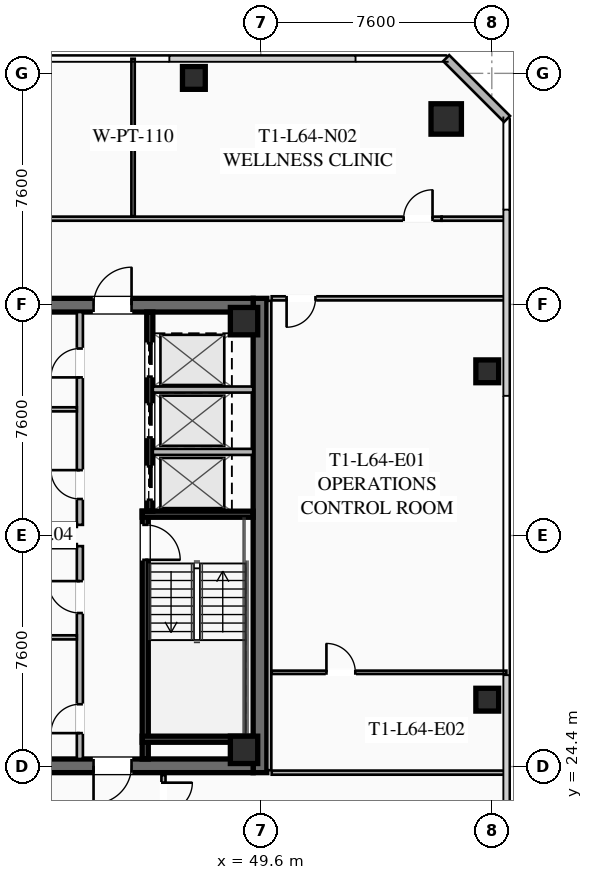
"""IFC4 building model, lengths in metres.
Left out: names, types, materials, properties, quantities, classifications, styles, units other than length and angle.
Written with IfcOpenShell. Run it as: python <this file> out.ifc"""

import sys

from ifc_helpers import new_model, si_unit, direction, frame, frame_2d, origin, origin_2d, place, context, subcontext, project, spatial, rectangle, hollow_rectangle, extrude, element, fill, save


model = new_model("IFC4")
c1 = context("Model", 3, precision=1e-05, world=origin(), true_north=direction((0.0, 1.0)))
c2 = subcontext(c1, "Body", "Model", "MODEL_VIEW")
j1 = project(units=[si_unit("LENGTHUNIT", "METRE"), si_unit("PLANEANGLEUNIT", "RADIAN")], contexts=[c1])
p1 = place(None, origin())
s1 = spatial("IfcSite", under=j1, at=p1, CompositionType="ELEMENT")
p2 = place(p1, origin())
s2 = spatial("IfcBuilding", under=s1, at=p2, CompositionType="ELEMENT")
p3 = place(p2, frame((0.0, 0.0, 236.15)))
s3 = spatial("IfcBuildingStorey", under=s2, at=p3, CompositionType="ELEMENT", Elevation=236.15)
p4 = place(p3, frame((49.575, 39.8, 0.0), z_axis=(0.0, 0.0, 1.0), x_axis=(0.0, -1.0, 0.0)))
e1 = element("IfcWall", 1, at=p4, inside=s3, PredefinedType="SHEAR", context=c2, shape_type="SweptSolid", body=[
    extrude(rectangle(XDim=15.6, YDim=0.45, at=frame_2d((7.8, 0.0))), origin(), (0.0, 0.0, 1.0), 3.55),
])
p5 = place(p3, frame((49.35, 24.425, 0.0), z_axis=(0.0, 0.0, 1.0), x_axis=(-1.0, 0.0, 0.0)))
e2 = element("IfcWall", 2, at=p5, inside=s3, PredefinedType="SHEAR", context=c2, shape_type="SweptSolid", body=[
    extrude(rectangle(XDim=14.7, YDim=0.45, at=frame_2d((7.35, 0.0))), origin(), (0.0, 0.0, 1.0), 3.55),
])
p6 = place(p5, frame((9.05, 0.0, 0.0)))
e3 = element("IfcOpeningElement", 3, at=p6, cuts=e2, PredefinedType="OPENING", context=c2, shape_type="SweptSolid", body=[
    extrude(rectangle(XDim=1.25, YDim=2.25, at=frame_2d((0.625, 1.125))), frame((0.0, 0.235, 0.0), z_axis=(0.0, -1.0, 0.0), x_axis=(1.0, 0.0, 0.0)), (0.0, 0.0, 1.0), 0.47),
])
p7 = place(p5, frame((4.0, 0.0, 0.0)))
e4 = element("IfcOpeningElement", 4, at=p7, cuts=e2, PredefinedType="OPENING", context=c2, shape_type="SweptSolid", body=[
    extrude(rectangle(XDim=1.25, YDim=2.25, at=frame_2d((0.625, 1.125))), frame((0.0, 0.235, 0.0), z_axis=(0.0, -1.0, 0.0), x_axis=(1.0, 0.0, 0.0)), (0.0, 0.0, 1.0), 0.47),
])
p8 = place(p3, frame((34.65, 39.575, 0.0), z_axis=(0.0, 0.0, 1.0), x_axis=(1.0, 0.0, 0.0)))
e5 = element("IfcWall", 5, at=p8, inside=s3, PredefinedType="SHEAR", context=c2, shape_type="SweptSolid", body=[
    extrude(rectangle(XDim=14.7, YDim=0.45, at=frame_2d((7.35, 0.0))), origin(), (0.0, 0.0, 1.0), 3.55),
])
p9 = place(p8, frame((4.4, 0.0, 0.0)))
e6 = element("IfcOpeningElement", 6, at=p9, cuts=e5, PredefinedType="OPENING", context=c2, shape_type="SweptSolid", body=[
    extrude(rectangle(XDim=1.25, YDim=2.25, at=frame_2d((0.625, 1.125))), frame((0.0, 0.235, 0.0), z_axis=(0.0, -1.0, 0.0), x_axis=(1.0, 0.0, 0.0)), (0.0, 0.0, 1.0), 0.47),
])
p10 = place(p8, frame((9.45, 0.0, 0.0)))
e7 = element("IfcOpeningElement", 7, at=p10, cuts=e5, PredefinedType="OPENING", context=c2, shape_type="SweptSolid", body=[
    extrude(rectangle(XDim=1.25, YDim=2.25, at=frame_2d((0.625, 1.125))), frame((0.0, 0.235, 0.0), z_axis=(0.0, -1.0, 0.0), x_axis=(1.0, 0.0, 0.0)), (0.0, 0.0, 1.0), 0.47),
])
for number, where, z_axis, x_axis in (
    (8, (49.05, 24.95, 0.0), (0.0, 0.0, 1.0), (1.0, 0.0, 0.0)),
    (9, (49.05, 39.05, 0.0), (0.0, 0.0, 1.0), (1.0, 0.0, 0.0)),
):
    element("IfcColumn", number, at=place(p3, frame(where, z_axis=z_axis, x_axis=x_axis)), inside=s3, PredefinedType="COLUMN", context=c2, shape_type="SweptSolid", body=[
        extrude(hollow_rectangle(XDim=0.9, YDim=0.9, WallThickness=0.04, at=origin_2d()), origin(), (0.0, 0.0, 1.0), 3.37),
    ])
p11 = place(p3, frame((55.7, 45.7, 0.0), z_axis=(0.0, 0.0, 1.0), x_axis=(1.0, 0.0, 0.0)))
e10 = element("IfcColumn", 10, at=p11, inside=s3, PredefinedType="COLUMN", context=c2, shape_type="SweptSolid", body=[
    extrude(hollow_rectangle(XDim=1.0, YDim=1.0, WallThickness=0.04, at=origin_2d()), origin(), (0.0, 0.0, 1.0), 3.37),
])
for number, where, z_axis, x_axis in (
    (11, (57.05, 26.6, 0.0), (0.0, 0.0, 1.0), (1.0, 0.0, 0.0)),
    (12, (57.05, 37.4, 0.0), (0.0, 0.0, 1.0), (1.0, 0.0, 0.0)),
    (13, (47.4, 47.05, 0.0), (0.0, 0.0, 1.0), (1.0, 0.0, 0.0)),
):
    element("IfcColumn", number, at=place(p3, frame(where, z_axis=z_axis, x_axis=x_axis)), inside=s3, PredefinedType="COLUMN", context=c2, shape_type="SweptSolid", body=[
        extrude(hollow_rectangle(XDim=0.75, YDim=0.75, WallThickness=0.032, at=origin_2d()), origin(), (0.0, 0.0, 1.0), 3.37),
    ])
p12 = place(p3, frame((55.7, 47.7, 0.0), z_axis=(0.0, 0.0, 1.0), x_axis=(0.707106781187, -0.707106781187, 0.0)))
e14 = element("IfcWall", 14, at=p12, inside=s3, PredefinedType="SOLIDWALL", context=c2, shape_type="SweptSolid", body=[
    extrude(rectangle(XDim=2.828, YDim=0.28, at=frame_2d((1.414, 0.0))), origin(), (0.0, 0.0, 1.0), 3.37),
])
p13 = place(p3, frame((45.8, 32.8, 0.0), z_axis=(0.0, 0.0, 1.0), x_axis=(0.0, -1.0, 0.0)))
e15 = element("IfcWall", 15, at=p13, inside=s3, PredefinedType="SHEAR", context=c2, shape_type="SweptSolid", body=[
    extrude(rectangle(XDim=8.15, YDim=0.2, at=frame_2d((4.075, 0.0))), origin(), (0.0, 0.0, 1.0), 3.37),
])
p14 = place(p13, frame((0.45, 0.0, 0.0)))
e16 = element("IfcOpeningElement", 16, at=p14, cuts=e15, PredefinedType="OPENING", context=c2, shape_type="SweptSolid", body=[
    extrude(rectangle(XDim=1.15, YDim=2.2, at=frame_2d((0.575, 1.1))), frame((0.0, 0.11, 0.0), z_axis=(0.0, -1.0, 0.0), x_axis=(1.0, 0.0, 0.0)), (0.0, 0.0, 1.0), 0.22),
])
for number, where, z_axis, x_axis in (
    (17, (45.7, 32.7, 0.0), (0.0, 0.0, 1.0), (1.0, 0.0, 0.0)),
    (18, (45.7, 25.3, 0.0), (0.0, 0.0, 1.0), (1.0, 0.0, 0.0)),
):
    element("IfcWall", number, at=place(p3, frame(where, z_axis=z_axis, x_axis=x_axis)), inside=s3, PredefinedType="SHEAR", context=c2, shape_type="SweptSolid", body=[
        extrude(rectangle(XDim=3.65, YDim=0.2, at=frame_2d((1.825, 0.0))), origin(), (0.0, 0.0, 1.0), 3.37),
    ])
p15 = place(p3, frame((45.95, 39.35, 0.0), z_axis=(0.0, 0.0, 1.0), x_axis=(0.0, -1.0, 0.0)))
e19 = element("IfcWall", 19, at=p15, inside=s3, PredefinedType="SHEAR", context=c2, shape_type="SweptSolid", body=[
    extrude(rectangle(XDim=6.55, YDim=0.2, at=frame_2d((3.275, 0.0))), origin(), (0.0, 0.0, 1.0), 3.37),
])
p16 = place(p15, frame((5.075, 0.0, 0.0)))
e20 = element("IfcOpeningElement", 20, at=p16, cuts=e19, PredefinedType="OPENING", context=c2, shape_type="SweptSolid", body=[
    extrude(rectangle(XDim=1.1, YDim=2.2, at=frame_2d((0.55, 1.1))), frame((0.0, 0.11, 0.0), z_axis=(0.0, -1.0, 0.0), x_axis=(1.0, 0.0, 0.0)), (0.0, 0.0, 1.0), 0.22),
])
p17 = place(p15, frame((3.025, 0.0, 0.0)))
e21 = element("IfcOpeningElement", 21, at=p17, cuts=e19, PredefinedType="OPENING", context=c2, shape_type="SweptSolid", body=[
    extrude(rectangle(XDim=1.1, YDim=2.2, at=frame_2d((0.55, 1.1))), frame((0.0, 0.11, 0.0), z_axis=(0.0, -1.0, 0.0), x_axis=(1.0, 0.0, 0.0)), (0.0, 0.0, 1.0), 0.22),
])
p18 = place(p15, frame((1.025, 0.0, 0.0)))
e22 = element("IfcOpeningElement", 22, at=p18, cuts=e19, PredefinedType="OPENING", context=c2, shape_type="SweptSolid", body=[
    extrude(rectangle(XDim=1.1, YDim=2.2, at=frame_2d((0.55, 1.1))), frame((0.0, 0.11, 0.0), z_axis=(0.0, -1.0, 0.0), x_axis=(1.0, 0.0, 0.0)), (0.0, 0.0, 1.0), 0.22),
])
for number, where, z_axis, x_axis in (
    (23, (46.05, 34.75, 0.0), (0.0, 0.0, 1.0), (1.0, 0.0, 0.0)),
    (24, (46.05, 36.8, 0.0), (0.0, 0.0, 1.0), (1.0, 0.0, 0.0)),
):
    element("IfcWall", number, at=place(p3, frame(where, z_axis=z_axis, x_axis=x_axis)), inside=s3, PredefinedType="SOLIDWALL", context=c2, shape_type="SweptSolid", body=[
        extrude(rectangle(XDim=3.3, YDim=0.2, at=frame_2d((1.65, 0.0))), origin(), (0.0, 0.0, 1.0), 3.37),
    ])
p19 = place(p3, frame((43.65, 24.65, 0.0), z_axis=(0.0, 0.0, 1.0), x_axis=(0.0, 1.0, 0.0)))
e25 = element("IfcWall", 25, at=p19, inside=s3, PredefinedType="SOLIDWALL", context=c2, shape_type="SweptSolid", body=[
    extrude(rectangle(XDim=7.0, YDim=0.2, at=frame_2d((3.5, 0.0))), origin(), (0.0, 0.0, 1.0), 2.723),
])
p20 = place(p19, frame((0.85, 0.0, 0.0)))
e26 = element("IfcOpeningElement", 26, at=p20, cuts=e25, PredefinedType="OPENING", context=c2, shape_type="SweptSolid", body=[
    extrude(rectangle(XDim=0.95, YDim=2.05, at=frame_2d((0.475, 1.025))), frame((0.0, 0.11, 0.0), z_axis=(0.0, -1.0, 0.0), x_axis=(1.0, 0.0, 0.0)), (0.0, 0.0, 1.0), 0.22),
])
p21 = place(p19, frame((4.8, 0.0, 0.0)))
e27 = element("IfcOpeningElement", 27, at=p21, cuts=e25, PredefinedType="OPENING", context=c2, shape_type="SweptSolid", body=[
    extrude(rectangle(XDim=1.05, YDim=2.2, at=frame_2d((0.525, 1.1))), frame((0.0, 0.11, 0.0), z_axis=(0.0, -1.0, 0.0), x_axis=(1.0, 0.0, 0.0)), (0.0, 0.0, 1.0), 0.22),
])
for number, where, z_axis, x_axis in (
    (28, (41.67, 31.65, 0.0), (0.0, 0.0, 1.0), (1.0, 0.0, 0.0)),
    (29, (41.67, 28.65, 0.0), (0.0, 0.0, 1.0), (1.0, 0.0, 0.0)),
):
    element("IfcWall", number, at=place(p3, frame(where, z_axis=z_axis, x_axis=x_axis)), inside=s3, PredefinedType="PARTITIONING", context=c2, shape_type="SweptSolid", body=[
        extrude(rectangle(XDim=1.88, YDim=0.135, at=frame_2d((0.94, 0.0))), origin(), (0.0, 0.0, 1.0), 2.723),
    ])
p22 = place(p3, frame((43.65, 32.35, 0.0), z_axis=(0.0, 0.0, 1.0), x_axis=(0.0, 1.0, 0.0)))
e30 = element("IfcWall", 30, at=p22, inside=s3, PredefinedType="SOLIDWALL", context=c2, shape_type="SweptSolid", body=[
    extrude(rectangle(XDim=7.0, YDim=0.2, at=frame_2d((3.5, 0.0))), origin(), (0.0, 0.0, 1.0), 2.723),
])
p23 = place(p22, frame((0.85, 0.0, 0.0)))
e31 = element("IfcOpeningElement", 31, at=p23, cuts=e30, PredefinedType="OPENING", context=c2, shape_type="SweptSolid", body=[
    extrude(rectangle(XDim=0.95, YDim=2.05, at=frame_2d((0.475, 1.025))), frame((0.0, 0.11, 0.0), z_axis=(0.0, -1.0, 0.0), x_axis=(1.0, 0.0, 0.0)), (0.0, 0.0, 1.0), 0.22),
])
p24 = place(p22, frame((4.85, 0.0, 0.0)))
e32 = element("IfcOpeningElement", 32, at=p24, cuts=e30, PredefinedType="OPENING", context=c2, shape_type="SweptSolid", body=[
    extrude(rectangle(XDim=0.95, YDim=2.05, at=frame_2d((0.475, 1.025))), frame((0.0, 0.11, 0.0), z_axis=(0.0, -1.0, 0.0), x_axis=(1.0, 0.0, 0.0)), (0.0, 0.0, 1.0), 0.22),
])
for number, where, z_axis, x_axis in (
    (33, (41.67, 32.35, 0.0), (0.0, 0.0, 1.0), (1.0, 0.0, 0.0)),
    (34, (41.67, 36.15, 0.0), (0.0, 0.0, 1.0), (1.0, 0.0, 0.0)),
):
    element("IfcWall", number, at=place(p3, frame(where, z_axis=z_axis, x_axis=x_axis)), inside=s3, PredefinedType="PARTITIONING", context=c2, shape_type="SweptSolid", body=[
        extrude(rectangle(XDim=1.88, YDim=0.135, at=frame_2d((0.94, 0.0))), origin(), (0.0, 0.0, 1.0), 2.723),
    ])
p25 = place(p3, frame((28.45, 42.42, 0.0), z_axis=(0.0, 0.0, 1.0), x_axis=(1.0, 0.0, 0.0)))
e35 = element("IfcWall", 35, at=p25, inside=s3, PredefinedType="PARTITIONING", context=c2, shape_type="SweptSolid", body=[
    extrude(rectangle(XDim=27.1, YDim=0.135, at=frame_2d((13.55, 0.0))), origin(), (0.0, 0.0, 1.0), 2.723),
])
p26 = place(p25, frame((0.3, 0.0, 0.0)))
e36 = element("IfcOpeningElement", 36, at=p26, cuts=e35, PredefinedType="OPENING", context=c2, shape_type="SweptSolid", body=[
    extrude(rectangle(XDim=0.95, YDim=2.05, at=frame_2d((0.475, 1.025))), frame((0.0, 0.077, 0.0), z_axis=(0.0, -1.0, 0.0), x_axis=(1.0, 0.0, 0.0)), (0.0, 0.0, 1.0), 0.155),
])
p27 = place(p25, frame((25.85, 0.0, 0.0)))
e37 = element("IfcOpeningElement", 37, at=p27, cuts=e35, PredefinedType="OPENING", context=c2, shape_type="SweptSolid", body=[
    extrude(rectangle(XDim=0.95, YDim=2.05, at=frame_2d((0.475, 1.025))), frame((0.0, 0.077, 0.0), z_axis=(0.0, -1.0, 0.0), x_axis=(1.0, 0.0, 0.0)), (0.0, 0.0, 1.0), 0.155),
])
p28 = place(p3, frame((55.55, 42.42, 0.0), z_axis=(0.0, 0.0, 1.0), x_axis=(1.0, 0.0, 0.0)))
e38 = element("IfcWall", 38, at=p28, inside=s3, PredefinedType="PARTITIONING", context=c2, shape_type="SweptSolid", body=[
    extrude(rectangle(XDim=2.13, YDim=0.135, at=frame_2d((1.065, 0.0))), origin(), (0.0, 0.0, 1.0), 2.723),
])
p29 = place(p3, frame((45.4, 42.5, 0.0), z_axis=(0.0, 0.0, 1.0), x_axis=(0.0, 1.0, 0.0)))
e39 = element("IfcWall", 39, at=p29, inside=s3, PredefinedType="PARTITIONING", context=c2, shape_type="SweptSolid", body=[
    extrude(rectangle(XDim=5.18, YDim=0.11, at=frame_2d((2.59, 0.0))), origin(), (0.0, 0.0, 1.0), 2.723),
])
p30 = place(p3, frame((46.4, 24.12, 0.0), z_axis=(0.0, 0.0, 1.0), x_axis=(0.0, -1.0, 0.0)))
e40 = element("IfcWall", 40, at=p30, inside=s3, PredefinedType="PARTITIONING", context=c2, shape_type="SweptSolid", body=[
    extrude(rectangle(XDim=1.29, YDim=0.135, at=frame_2d((0.645, 0.0))), origin(), (0.0, 0.0, 1.0), 2.723),
])
p31 = place(p30, frame((0.25, 0.0, 0.0)))
e41 = element("IfcOpeningElement", 41, at=p31, cuts=e40, PredefinedType="OPENING", context=c2, shape_type="SweptSolid", body=[
    extrude(rectangle(XDim=0.95, YDim=2.05, at=frame_2d((0.475, 1.025))), frame((0.0, 0.077, 0.0), z_axis=(0.0, -1.0, 0.0), x_axis=(1.0, 0.0, 0.0)), (0.0, 0.0, 1.0), 0.155),
])
p32 = place(p3, frame((49.88, 39.72, 0.0), z_axis=(0.0, 0.0, 1.0), x_axis=(0.0, -1.0, 0.0)))
e42 = element("IfcWall", 42, at=p32, inside=s3, PredefinedType="PARTITIONING", context=c2, shape_type="SweptSolid", body=[
    extrude(rectangle(XDim=15.44, YDim=0.135, at=frame_2d((7.72, 0.0))), origin(), (0.0, 0.0, 1.0), 2.723),
])
p33 = place(p3, frame((57.68, 39.8, 0.0), z_axis=(0.0, 0.0, 1.0), x_axis=(-1.0, 0.0, 0.0)))
e43 = element("IfcWall", 43, at=p33, inside=s3, PredefinedType="PARTITIONING", context=c2, shape_type="SweptSolid", body=[
    extrude(rectangle(XDim=7.72, YDim=0.135, at=frame_2d((3.86, 0.0))), origin(), (0.0, 0.0, 1.0), 2.723),
])
p34 = place(p33, frame((6.28, 0.0, 0.0)))
e44 = element("IfcOpeningElement", 44, at=p34, cuts=e43, PredefinedType="OPENING", context=c2, shape_type="SweptSolid", body=[
    extrude(rectangle(XDim=0.95, YDim=2.05, at=frame_2d((0.475, 1.025))), frame((0.0, 0.077, 0.0), z_axis=(0.0, -1.0, 0.0), x_axis=(1.0, 0.0, 0.0)), (0.0, 0.0, 1.0), 0.155),
])
p35 = place(p3, frame((49.96, 24.2, 0.0), z_axis=(0.0, 0.0, 1.0), x_axis=(1.0, 0.0, 0.0)))
e45 = element("IfcWall", 45, at=p35, inside=s3, PredefinedType="PARTITIONING", context=c2, shape_type="SweptSolid", body=[
    extrude(rectangle(XDim=7.72, YDim=0.135, at=frame_2d((3.86, 0.0))), origin(), (0.0, 0.0, 1.0), 2.723),
])
p36 = place(p3, frame((49.96, 27.5, 0.0), z_axis=(0.0, 0.0, 1.0), x_axis=(1.0, 0.0, 0.0)))
e46 = element("IfcWall", 46, at=p36, inside=s3, PredefinedType="PARTITIONING", context=c2, shape_type="SweptSolid", body=[
    extrude(rectangle(XDim=7.72, YDim=0.11, at=frame_2d((3.86, 0.0))), origin(), (0.0, 0.0, 1.0), 2.723),
])
p37 = place(p36, frame((1.8, 0.0, 0.0)))
e47 = element("IfcOpeningElement", 47, at=p37, cuts=e46, PredefinedType="OPENING", context=c2, shape_type="SweptSolid", body=[
    extrude(rectangle(XDim=0.95, YDim=2.05, at=frame_2d((0.475, 1.025))), frame((0.0, 0.065, 0.0), z_axis=(0.0, -1.0, 0.0), x_axis=(1.0, 0.0, 0.0)), (0.0, 0.0, 1.0), 0.13),
])
p38 = place(p10, origin())
e48 = element("IfcDoor", 48, at=p38, inside=s3, OperationType="SINGLE_SWING_RIGHT", PredefinedType="DOOR", context=c2, shape_type="SweptSolid", body=[
    extrude(rectangle(XDim=1.25, YDim=2.25, at=frame_2d((0.625, 1.125))), frame((0.0, 0.025, 0.0), z_axis=(0.0, -1.0, 0.0), x_axis=(1.0, 0.0, 0.0)), (0.0, 0.0, 1.0), 0.05),
])
fill(e7, e48)
p39 = place(p7, origin())
e49 = element("IfcDoor", 49, at=p39, inside=s3, OperationType="SINGLE_SWING_RIGHT", PredefinedType="DOOR", context=c2, shape_type="SweptSolid", body=[
    extrude(rectangle(XDim=1.25, YDim=2.25, at=frame_2d((0.625, 1.125))), frame((0.0, 0.025, 0.0), z_axis=(0.0, -1.0, 0.0), x_axis=(1.0, 0.0, 0.0)), (0.0, 0.0, 1.0), 0.05),
])
fill(e4, e49)
p40 = place(p14, origin())
e50 = element("IfcDoor", 50, at=p40, inside=s3, OperationType="SINGLE_SWING_RIGHT", PredefinedType="DOOR", context=c2, shape_type="SweptSolid", body=[
    extrude(rectangle(XDim=1.15, YDim=2.2, at=frame_2d((0.575, 1.1))), frame((0.0, 0.025, 0.0), z_axis=(0.0, -1.0, 0.0), x_axis=(1.0, 0.0, 0.0)), (0.0, 0.0, 1.0), 0.05),
])
fill(e16, e50)
p41 = place(p20, origin())
e51 = element("IfcDoor", 51, at=p41, inside=s3, OperationType="SINGLE_SWING_LEFT", PredefinedType="DOOR", context=c2, shape_type="SweptSolid", body=[
    extrude(rectangle(XDim=0.95, YDim=2.05, at=frame_2d((0.475, 1.025))), frame((0.0, 0.025, 0.0), z_axis=(0.0, -1.0, 0.0), x_axis=(1.0, 0.0, 0.0)), (0.0, 0.0, 1.0), 0.05),
])
fill(e26, e51)
p42 = place(p21, origin())
e52 = element("IfcDoor", 52, at=p42, inside=s3, OperationType="SINGLE_SWING_RIGHT", PredefinedType="DOOR", context=c2, shape_type="SweptSolid", body=[
    extrude(rectangle(XDim=1.05, YDim=2.2, at=frame_2d((0.525, 1.1))), frame((0.0, 0.025, 0.0), z_axis=(0.0, -1.0, 0.0), x_axis=(1.0, 0.0, 0.0)), (0.0, 0.0, 1.0), 0.05),
])
fill(e27, e52)
p43 = place(p23, origin())
e53 = element("IfcDoor", 53, at=p43, inside=s3, OperationType="SINGLE_SWING_RIGHT", PredefinedType="DOOR", context=c2, shape_type="SweptSolid", body=[
    extrude(rectangle(XDim=0.95, YDim=2.05, at=frame_2d((0.475, 1.025))), frame((0.0, 0.025, 0.0), z_axis=(0.0, -1.0, 0.0), x_axis=(1.0, 0.0, 0.0)), (0.0, 0.0, 1.0), 0.05),
])
fill(e31, e53)
p44 = place(p24, origin())
e54 = element("IfcDoor", 54, at=p44, inside=s3, OperationType="SINGLE_SWING_LEFT", PredefinedType="DOOR", context=c2, shape_type="SweptSolid", body=[
    extrude(rectangle(XDim=0.95, YDim=2.05, at=frame_2d((0.475, 1.025))), frame((0.0, 0.025, 0.0), z_axis=(0.0, -1.0, 0.0), x_axis=(1.0, 0.0, 0.0)), (0.0, 0.0, 1.0), 0.05),
])
fill(e32, e54)
p45 = place(p27, origin())
e55 = element("IfcDoor", 55, at=p45, inside=s3, OperationType="SINGLE_SWING_RIGHT", PredefinedType="DOOR", context=c2, shape_type="SweptSolid", body=[
    extrude(rectangle(XDim=0.95, YDim=2.05, at=frame_2d((0.475, 1.025))), frame((0.0, 0.025, 0.0), z_axis=(0.0, -1.0, 0.0), x_axis=(1.0, 0.0, 0.0)), (0.0, 0.0, 1.0), 0.05),
])
fill(e37, e55)
p46 = place(p31, origin())
e56 = element("IfcDoor", 56, at=p46, inside=s3, OperationType="SINGLE_SWING_LEFT", PredefinedType="DOOR", context=c2, shape_type="SweptSolid", body=[
    extrude(rectangle(XDim=0.95, YDim=2.05, at=frame_2d((0.475, 1.025))), frame((0.0, 0.025, 0.0), z_axis=(0.0, -1.0, 0.0), x_axis=(1.0, 0.0, 0.0)), (0.0, 0.0, 1.0), 0.05),
])
fill(e41, e56)
p47 = place(p34, origin())
e57 = element("IfcDoor", 57, at=p47, inside=s3, OperationType="SINGLE_SWING_RIGHT", PredefinedType="DOOR", context=c2, shape_type="SweptSolid", body=[
    extrude(rectangle(XDim=0.95, YDim=2.05, at=frame_2d((0.475, 1.025))), frame((0.0, 0.025, 0.0), z_axis=(0.0, -1.0, 0.0), x_axis=(1.0, 0.0, 0.0)), (0.0, 0.0, 1.0), 0.05),
])
fill(e44, e57)
p48 = place(p37, origin())
e58 = element("IfcDoor", 58, at=p48, inside=s3, OperationType="SINGLE_SWING_LEFT", PredefinedType="DOOR", context=c2, shape_type="SweptSolid", body=[
    extrude(rectangle(XDim=0.95, YDim=2.05, at=frame_2d((0.475, 1.025))), frame((0.0, 0.025, 0.0), z_axis=(0.0, -1.0, 0.0), x_axis=(1.0, 0.0, 0.0)), (0.0, 0.0, 1.0), 0.05),
])
fill(e47, e58)
p49 = place(p16, origin())
e59 = element("IfcDoor", 59, at=p49, inside=s3, OperationType="SLIDING_TO_LEFT", PredefinedType="DOOR", context=c2, shape_type="SweptSolid", body=[
    extrude(rectangle(XDim=1.1, YDim=2.2, at=frame_2d((0.55, 1.1))), frame((0.0, 0.025, 0.0), z_axis=(0.0, -1.0, 0.0), x_axis=(1.0, 0.0, 0.0)), (0.0, 0.0, 1.0), 0.05),
])
fill(e20, e59)
p50 = place(p17, origin())
e60 = element("IfcDoor", 60, at=p50, inside=s3, OperationType="SLIDING_TO_LEFT", PredefinedType="DOOR", context=c2, shape_type="SweptSolid", body=[
    extrude(rectangle(XDim=1.1, YDim=2.2, at=frame_2d((0.55, 1.1))), frame((0.0, 0.025, 0.0), z_axis=(0.0, -1.0, 0.0), x_axis=(1.0, 0.0, 0.0)), (0.0, 0.0, 1.0), 0.05),
])
fill(e21, e60)
p51 = place(p18, origin())
e61 = element("IfcDoor", 61, at=p51, inside=s3, OperationType="SLIDING_TO_LEFT", PredefinedType="DOOR", context=c2, shape_type="SweptSolid", body=[
    extrude(rectangle(XDim=1.1, YDim=2.2, at=frame_2d((0.55, 1.1))), frame((0.0, 0.025, 0.0), z_axis=(0.0, -1.0, 0.0), x_axis=(1.0, 0.0, 0.0)), (0.0, 0.0, 1.0), 0.05),
])
fill(e22, e61)
save(model, sys.argv[1])
